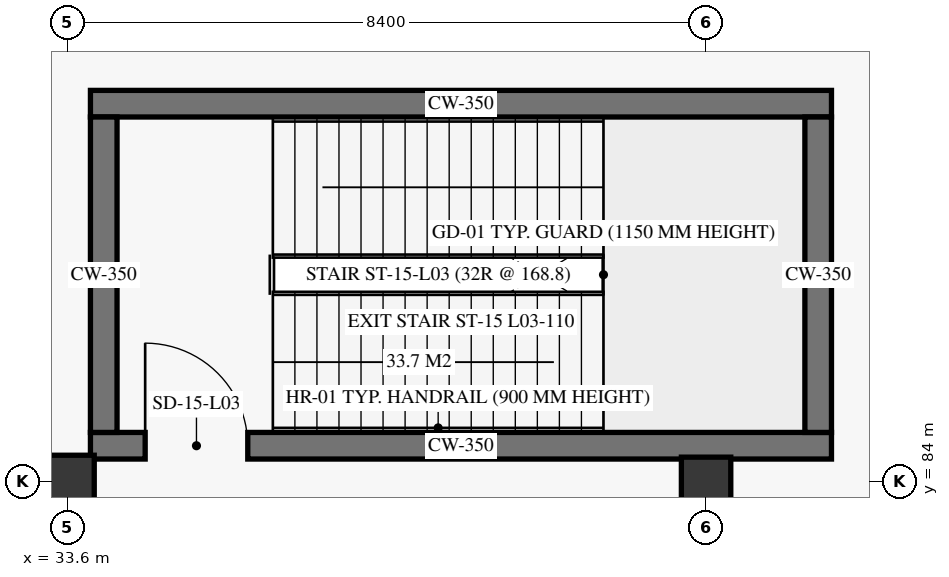
"""IFC4 building model, lengths in metres.
Left out: names, types, materials, properties, quantities, classifications, styles, units other than length and angle.
Written with IfcOpenShell. Run it as: python <this file> out.ifc"""

import sys

from ifc_helpers import new_model, si_unit, direction, frame, frame_2d, origin, origin_2d, place, context, subcontext, project, spatial, rectangle, extrude, element, fill, save


model = new_model("IFC4")
c1 = context("Model", 3, precision=1e-05, world=origin(), true_north=direction((0.0, 1.0)))
c2 = subcontext(c1, "Body", "Model", "MODEL_VIEW")
j1 = project(units=[si_unit("LENGTHUNIT", "METRE"), si_unit("PLANEANGLEUNIT", "RADIAN")], contexts=[c1])
p1 = place(None, origin())
s1 = spatial("IfcSite", under=j1, at=p1, CompositionType="ELEMENT")
p2 = place(p1, origin())
s2 = spatial("IfcBuilding", under=s1, at=p2, CompositionType="ELEMENT")
p3 = place(p2, frame((0.0, 0.0, 11.4)))
s3 = spatial("IfcBuildingStorey", under=s2, at=p3, CompositionType="ELEMENT", Elevation=11.4)
p4 = place(p3, frame((33.6, 84.0, 0.0), z_axis=(0.0, 0.0, 1.0), x_axis=(1.0, 0.0, 0.0)))
e1 = element("IfcColumn", 1, at=p4, inside=s3, PredefinedType="COLUMN", context=c2, shape_type="SweptSolid", body=[
    extrude(rectangle(XDim=0.7, YDim=0.7, at=origin_2d()), origin(), (0.0, 0.0, 1.0), 5.1),
])
p5 = place(p3, frame((42.0, 84.0, 0.0), z_axis=(0.0, 0.0, 1.0), x_axis=(1.0, 0.0, 0.0)))
e2 = element("IfcColumn", 2, at=p5, inside=s3, PredefinedType="COLUMN", context=c2, shape_type="SweptSolid", body=[
    extrude(rectangle(XDim=0.65, YDim=0.65, at=origin_2d()), origin(), (0.0, 0.0, 1.0), 5.1),
])
p6 = place(p3, frame((33.9, 84.475, 0.0), z_axis=(0.0, 0.0, 1.0), x_axis=(1.0, 0.0, 0.0)))
e3 = element("IfcWall", 3, at=p6, inside=s3, PredefinedType="SHEAR", context=c2, shape_type="SweptSolid", body=[
    extrude(rectangle(XDim=9.75, YDim=0.35, at=frame_2d((4.875, 0.0))), origin(), (0.0, 0.0, 1.0), 5.1),
])
p7 = place(p6, frame((0.72, 0.0, 0.0)))
e4 = element("IfcOpeningElement", 4, at=p7, cuts=e3, PredefinedType="OPENING", context=c2, shape_type="SweptSolid", body=[
    extrude(rectangle(XDim=1.35, YDim=2.25, at=frame_2d((0.675, 1.125))), frame((0.0, 0.185, 0.0), z_axis=(0.0, -1.0, 0.0), x_axis=(1.0, 0.0, 0.0)), (0.0, 0.0, 1.0), 0.37),
])
p8 = place(p3, frame((33.9, 88.975, 0.0), z_axis=(0.0, 0.0, 1.0), x_axis=(1.0, 0.0, 0.0)))
e5 = element("IfcWall", 5, at=p8, inside=s3, PredefinedType="SHEAR", context=c2, shape_type="SweptSolid", body=[
    extrude(rectangle(XDim=9.75, YDim=0.35, at=frame_2d((4.875, 0.0))), origin(), (0.0, 0.0, 1.0), 5.1),
])
for number, where, z_axis, x_axis in (
    (6, (34.075, 84.65, 0.0), (0.0, 0.0, 1.0), (0.0, 1.0, 0.0)),
    (7, (43.475, 84.65, 0.0), (0.0, 0.0, 1.0), (0.0, 1.0, 0.0)),
):
    element("IfcWall", number, at=place(p3, frame(where, z_axis=z_axis, x_axis=x_axis)), inside=s3, PredefinedType="SHEAR", context=c2, shape_type="SweptSolid", body=[
        extrude(rectangle(XDim=4.15, YDim=0.35, at=frame_2d((2.075, 0.0))), origin(), (0.0, 0.0, 1.0), 5.1),
    ])
p9 = place(p7, origin())
e8 = element("IfcDoor", 8, at=p9, inside=s3, OperationType="SINGLE_SWING_LEFT", PredefinedType="DOOR", context=c2, shape_type="SweptSolid", body=[
    extrude(rectangle(XDim=1.35, YDim=2.25, at=frame_2d((0.675, 1.125))), frame((0.0, 0.025, 0.0), z_axis=(0.0, -1.0, 0.0), x_axis=(1.0, 0.0, 0.0)), (0.0, 0.0, 1.0), 0.05),
])
fill(e4, e8)
save(model, sys.argv[1])
